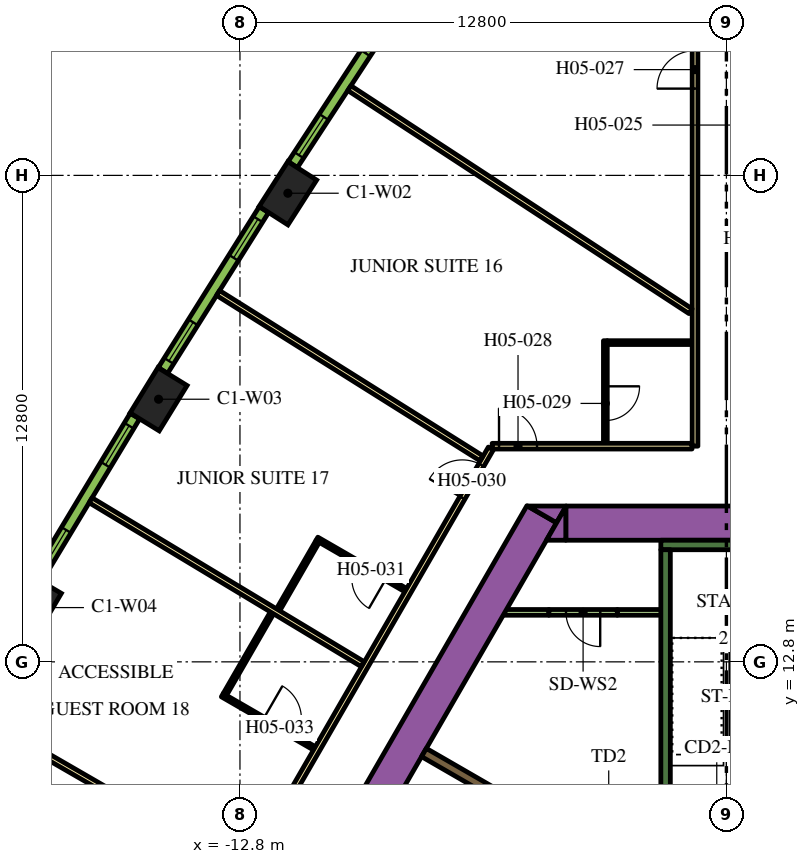
"""IFC4 building model, lengths in metres.
Left out: names, types, materials, properties, quantities, classifications, styles, units other than length and angle.
Written with IfcOpenShell. Run it as: python <this file> out.ifc"""

import sys

from ifc_helpers import new_model, si_unit, direction, frame, frame_2d, origin, origin_2d, place, context, subcontext, project, spatial, polyline, rectangle, outline, extrude, element, fill, save


model = new_model("IFC4")
c1 = context("Model", 3, precision=1e-05, world=origin(), true_north=direction((0.0, 1.0)))
c2 = subcontext(c1, "Body", "Model", "MODEL_VIEW")
j1 = project(units=[si_unit("LENGTHUNIT", "METRE"), si_unit("PLANEANGLEUNIT", "RADIAN")], contexts=[c1])
p1 = place(None, origin())
s1 = spatial("IfcSite", under=j1, at=p1, CompositionType="ELEMENT")
p2 = place(p1, origin())
s2 = spatial("IfcBuilding", under=s1, at=p2, CompositionType="ELEMENT")
p3 = place(p2, frame((0.0, 0.0, 74.4)))
s3 = spatial("IfcBuildingStorey", under=s2, at=p3, CompositionType="ELEMENT", Elevation=74.4)
for number, where, z_axis, x_axis in (
    (1, (-11.539, 25.131, 0.0), (0.0, 0.0, 1.0), (-0.539, -0.842, 0.0)),
    (2, (-14.942, 19.71, 0.0), (0.0, 0.0, 1.0), (-0.524, -0.852, 0.0)),
    (3, (-18.243, 14.228, 0.0), (0.0, 0.0, 1.0), (-0.508, -0.861, 0.0)),
):
    element("IfcColumn", number, at=place(p3, frame(where, z_axis=z_axis, x_axis=x_axis)), inside=s3, PredefinedType="COLUMN", context=c2, shape_type="SweptSolid", body=[
        extrude(rectangle(XDim=1.4, YDim=0.9, at=origin_2d()), origin(), (0.0, 0.0, 1.0), 3.9),
    ])
p4 = place(p3, frame((-15.36, -1.503, 0.0), z_axis=(0.0, 0.0, 1.0), x_axis=(0.50000389221, 0.866023156604, 0.0)))
e4 = element("IfcWall", 4, at=p4, inside=s3, PredefinedType="SOLIDWALL", context=c2, shape_type="SweptSolid", body=[
    extrude(rectangle(XDim=21.0, YDim=0.9, at=frame_2d((10.5, 0.0))), origin(), (0.0, 0.0, 1.0), 3.9),
])
p5 = place(p3, origin())
e5 = element("IfcWall", 5, at=p5, inside=s3, PredefinedType="SOLIDWALL", context=c2, shape_type="SweptSolid", body=[
    extrude(outline(polyline([(-4.215, 16.9), (-4.469, 16.46), (-5.231, 16.9), (-4.215, 16.9)])), origin(), (0.0, 0.0, 1.0), 3.9),
])
p6 = place(p3, frame((-4.224, 16.45, 0.0), z_axis=(0.0, 0.0, 1.0), x_axis=(1.0, 0.0, 0.0)))
e6 = element("IfcWall", 6, at=p6, inside=s3, PredefinedType="SOLIDWALL", context=c2, shape_type="SweptSolid", body=[
    extrude(rectangle(XDim=9.488, YDim=0.9, at=frame_2d((4.744, 0.0))), origin(), (0.0, 0.0, 1.0), 3.9),
])
e7 = element("IfcWall", 7, at=p5, inside=s3, PredefinedType="SOLIDWALL", context=c2, shape_type="SweptSolid", body=[
    extrude(outline(polyline([(-4.734, 16.0), (-4.226, 16.88), (-4.226, 16.0), (-4.734, 16.0)])), origin(), (0.0, 0.0, 1.0), 3.9),
])
p7 = place(p3, frame((-1.725, 15.875, 0.0), z_axis=(0.0, 0.0, 1.0), x_axis=(1.0, 0.0, 0.0)))
e8 = element("IfcWall", 8, at=p7, inside=s3, PredefinedType="SOLIDWALL", context=c2, shape_type="SweptSolid", body=[
    extrude(rectangle(XDim=3.45, YDim=0.25, at=frame_2d((1.725, 0.0))), origin(), (0.0, 0.0, 1.0), 3.9),
])
p8 = place(p3, frame((-1.6, 8.7, 0.0), z_axis=(0.0, 0.0, 1.0), x_axis=(0.0, 1.0, 0.0)))
e9 = element("IfcWall", 9, at=p8, inside=s3, PredefinedType="SOLIDWALL", context=c2, shape_type="SweptSolid", body=[
    extrude(rectangle(XDim=7.05, YDim=0.25, at=frame_2d((3.525, 0.0))), origin(), (0.0, 0.0, 1.0), 3.9),
])
p9 = place(p3, frame((-7.959, 10.415, 0.0), z_axis=(0.0, 0.0, 1.0), x_axis=(0.866020958405, -0.500007699544, 0.0)))
e10 = element("IfcWall", 10, at=p9, inside=s3, PredefinedType="SOLIDWALL", context=c2, shape_type="SweptSolid", body=[
    extrude(rectangle(XDim=4.1, YDim=0.25, at=frame_2d((2.05, 0.0))), origin(), (0.0, 0.0, 1.0), 3.9),
])
p10 = place(p3, frame((-5.851, 14.102, 0.0), z_axis=(0.0, 0.0, 1.0), x_axis=(1.0, 0.0, 0.0)))
e11 = element("IfcWall", 11, at=p10, inside=s3, PredefinedType="PARTITIONING", context=c2, shape_type="SweptSolid", body=[
    extrude(rectangle(XDim=1.18, YDim=0.15, at=frame_2d((0.59, 0.0))), origin(), (0.0, 0.0, 1.0), 2.7),
])
p11 = place(p3, frame((-2.871, 14.102, 0.0), z_axis=(0.0, 0.0, 1.0), x_axis=(1.0, 0.0, 0.0)))
e12 = element("IfcWall", 12, at=p11, inside=s3, PredefinedType="PARTITIONING", context=c2, shape_type="SweptSolid", body=[
    extrude(rectangle(XDim=1.196, YDim=0.15, at=frame_2d((0.598, 0.0))), origin(), (0.0, 0.0, 1.0), 2.7),
])
p12 = place(p3, frame((-2.871, 14.102, 0.0), z_axis=(0.0, 0.0, 1.0), x_axis=(-1.0, 0.0, 0.0)))
e13 = element("IfcWall", 13, at=p12, inside=s3, PredefinedType="PARTITIONING", context=c2, shape_type="SweptSolid", body=[
    extrude(rectangle(XDim=1.8, YDim=0.15, at=frame_2d((0.9, 0.0))), origin(), (0.0, 0.0, 1.0), 2.7),
])
p13 = place(p12, frame((0.45, 0.0, 0.0)))
e14 = element("IfcOpeningElement", 14, at=p13, cuts=e13, PredefinedType="OPENING", context=c2, shape_type="SweptSolid", body=[
    extrude(rectangle(XDim=0.9, YDim=2.1, at=frame_2d((0.45, 1.05))), frame((0.0, 0.085, 0.0), z_axis=(0.0, -1.0, 0.0), x_axis=(1.0, 0.0, 0.0)), (0.0, 0.0, 1.0), 0.17),
])
p14 = place(p3, frame((-0.825, 18.475, 0.0), z_axis=(0.0, 0.0, 1.0), x_axis=(0.0, 1.0, 0.0)))
e15 = element("IfcWall", 15, at=p14, inside=s3, PredefinedType="PARTITIONING", context=c2, shape_type="SweptSolid", body=[
    extrude(rectangle(XDim=16.224, YDim=0.15, at=frame_2d((8.112, 0.0))), origin(), (0.0, 0.0, 1.0), 2.7),
])
p15 = place(p14, frame((9.408, 0.0, 0.0)))
e16 = element("IfcOpeningElement", 16, at=p15, cuts=e15, PredefinedType="OPENING", context=c2, shape_type="SweptSolid", body=[
    extrude(rectangle(XDim=1.0, YDim=2.1, at=frame_2d((0.5, 1.05))), frame((0.0, 0.085, 0.0), z_axis=(0.0, -1.0, 0.0), x_axis=(1.0, 0.0, 0.0)), (0.0, 0.0, 1.0), 0.17),
])
p16 = place(p3, frame((-6.163, 18.475, 0.0), z_axis=(0.0, 0.0, 1.0), x_axis=(1.0, 0.0, 0.0)))
e17 = element("IfcWall", 17, at=p16, inside=s3, PredefinedType="PARTITIONING", context=c2, shape_type="SweptSolid", body=[
    extrude(rectangle(XDim=5.258, YDim=0.15, at=frame_2d((2.629, 0.0))), origin(), (0.0, 0.0, 1.0), 2.7),
])
p17 = place(p16, frame((0.18, 0.0, 0.0)))
e18 = element("IfcOpeningElement", 18, at=p17, cuts=e17, PredefinedType="OPENING", context=c2, shape_type="SweptSolid", body=[
    extrude(rectangle(XDim=1.0, YDim=2.1, at=frame_2d((0.5, 1.05))), frame((0.0, 0.085, 0.0), z_axis=(0.0, -1.0, 0.0), x_axis=(1.0, 0.0, 0.0)), (0.0, 0.0, 1.0), 0.17),
])
p18 = place(p3, frame((-19.081, -3.9, 0.0), z_axis=(0.0, 0.0, 1.0), x_axis=(0.499998313975, 0.866026377209, 0.0)))
e19 = element("IfcWall", 19, at=p18, inside=s3, PredefinedType="PARTITIONING", context=c2, shape_type="SweptSolid", body=[
    extrude(rectangle(XDim=25.766, YDim=0.15, at=frame_2d((12.883, 0.0))), origin(), (0.0, 0.0, 1.0), 2.7),
])
p19 = place(p18, frame((24.265, 0.0, 0.0)))
e20 = element("IfcOpeningElement", 20, at=p19, cuts=e19, PredefinedType="OPENING", context=c2, shape_type="SweptSolid", body=[
    extrude(rectangle(XDim=1.0, YDim=2.1, at=frame_2d((0.5, 1.05))), frame((0.0, 0.085, 0.0), z_axis=(0.0, -1.0, 0.0), x_axis=(1.0, 0.0, 0.0)), (0.0, 0.0, 1.0), 0.17),
])
p20 = place(p18, frame((13.146, 0.0, 0.0)))
e21 = element("IfcOpeningElement", 21, at=p20, cuts=e19, PredefinedType="OPENING", context=c2, shape_type="SweptSolid", body=[
    extrude(rectangle(XDim=1.1, YDim=2.1, at=frame_2d((0.55, 1.05))), frame((0.0, 0.085, 0.0), z_axis=(0.0, -1.0, 0.0), x_axis=(1.0, 0.0, 0.0)), (0.0, 0.0, 1.0), 0.17),
])
p21 = place(p18, frame((11.693, 0.0, 0.0)))
e22 = element("IfcOpeningElement", 22, at=p21, cuts=e19, PredefinedType="OPENING", context=c2, shape_type="SweptSolid", body=[
    extrude(rectangle(XDim=1.0, YDim=2.1, at=frame_2d((0.5, 1.05))), frame((0.0, 0.085, 0.0), z_axis=(0.0, -1.0, 0.0), x_axis=(1.0, 0.0, 0.0)), (0.0, 0.0, 1.0), 0.17),
])
p22 = place(p18, frame((0.18, 0.0, 0.0)))
e23 = element("IfcOpeningElement", 23, at=p22, cuts=e19, PredefinedType="OPENING", context=c2, shape_type="SweptSolid", body=[
    extrude(rectangle(XDim=1.0, YDim=2.1, at=frame_2d((0.5, 1.05))), frame((0.0, 0.085, 0.0), z_axis=(0.0, -1.0, 0.0), x_axis=(1.0, 0.0, 0.0)), (0.0, 0.0, 1.0), 0.17),
])
p23 = place(p3, frame((-19.982, 11.537, 0.0), z_axis=(0.0, 0.0, 1.0), x_axis=(0.866020994654, -0.500007636761, 0.0)))
e24 = element("IfcWall", 24, at=p23, inside=s3, PredefinedType="PARTITIONING", context=c2, shape_type="SweptSolid", body=[
    extrude(rectangle(XDim=8.423, YDim=0.15, at=frame_2d((4.211, 0.0))), origin(), (0.0, 0.0, 1.0), 2.7),
])
p24 = place(p3, frame((-16.729, 17.052, 0.0), z_axis=(0.0, 0.0, 1.0), x_axis=(0.856630606266, -0.515930232113, 0.0)))
e25 = element("IfcWall", 25, at=p24, inside=s3, PredefinedType="PARTITIONING", context=c2, shape_type="SweptSolid", body=[
    extrude(rectangle(XDim=8.355, YDim=0.15, at=frame_2d((4.178, 0.0))), origin(), (0.0, 0.0, 1.0), 2.7),
])
p25 = place(p3, frame((-13.376, 22.506, 0.0), z_axis=(0.0, 0.0, 1.0), x_axis=(0.846945608893, -0.531679542183, 0.0)))
e26 = element("IfcWall", 26, at=p25, inside=s3, PredefinedType="PARTITIONING", context=c2, shape_type="SweptSolid", body=[
    extrude(rectangle(XDim=8.182, YDim=0.15, at=frame_2d((4.091, 0.0))), origin(), (0.0, 0.0, 1.0), 2.7),
])
p26 = place(p3, frame((-9.922, 27.896, 0.0), z_axis=(0.0, 0.0, 1.0), x_axis=(0.836970816595, -0.547247523675, 0.0)))
e27 = element("IfcWall", 27, at=p26, inside=s3, PredefinedType="PARTITIONING", context=c2, shape_type="SweptSolid", body=[
    extrude(rectangle(XDim=10.729, YDim=0.15, at=frame_2d((5.364, 0.0))), origin(), (0.0, 0.0, 1.0), 2.7),
])
p27 = place(p3, frame((-3.185, 21.25, 0.0), z_axis=(0.0, 0.0, 1.0), x_axis=(0.0, -1.0, 0.0)))
e28 = element("IfcWall", 28, at=p27, inside=s3, PredefinedType="PARTITIONING", context=c2, shape_type="SweptSolid", body=[
    extrude(rectangle(XDim=2.7, YDim=0.1, at=frame_2d((1.35, 0.0))), origin(), (0.0, 0.0, 1.0), 2.7),
])
p28 = place(p27, frame((1.2, 0.0, 0.0)))
e29 = element("IfcOpeningElement", 29, at=p28, cuts=e28, PredefinedType="OPENING", context=c2, shape_type="SweptSolid", body=[
    extrude(rectangle(XDim=0.9, YDim=2.1, at=frame_2d((0.45, 1.05))), frame((0.0, 0.06, 0.0), z_axis=(0.0, -1.0, 0.0), x_axis=(1.0, 0.0, 0.0)), (0.0, 0.0, 1.0), 0.12),
])
p29 = place(p3, frame((-3.135, 21.2, 0.0), z_axis=(0.0, 0.0, 1.0), x_axis=(1.0, 0.0, 0.0)))
e30 = element("IfcWall", 30, at=p29, inside=s3, PredefinedType="PARTITIONING", context=c2, shape_type="SweptSolid", body=[
    extrude(rectangle(XDim=2.23, YDim=0.1, at=frame_2d((1.115, 0.0))), origin(), (0.0, 0.0, 1.0), 2.7),
])
p30 = place(p3, frame((-8.437, 14.687, 0.0), z_axis=(0.0, 0.0, 1.0), x_axis=(-0.866019956843, 0.50000943426, 0.0)))
e31 = element("IfcWall", 31, at=p30, inside=s3, PredefinedType="PARTITIONING", context=c2, shape_type="SweptSolid", body=[
    extrude(rectangle(XDim=2.7, YDim=0.1, at=frame_2d((1.35, 0.0))), origin(), (0.0, 0.0, 1.0), 2.7),
])
p31 = place(p30, frame((0.6, 0.0, 0.0)))
e32 = element("IfcOpeningElement", 32, at=p31, cuts=e31, PredefinedType="OPENING", context=c2, shape_type="SweptSolid", body=[
    extrude(rectangle(XDim=0.9, YDim=2.1, at=frame_2d((0.45, 1.05))), frame((0.0, 0.06, 0.0), z_axis=(0.0, -1.0, 0.0), x_axis=(1.0, 0.0, 0.0)), (0.0, 0.0, 1.0), 0.12),
])
p32 = place(p3, frame((-10.757, 15.969, 0.0), z_axis=(0.0, 0.0, 1.0), x_axis=(-0.499957272447, -0.866050071143, 0.0)))
e33 = element("IfcWall", 33, at=p32, inside=s3, PredefinedType="PARTITIONING", context=c2, shape_type="SweptSolid", body=[
    extrude(rectangle(XDim=2.07, YDim=0.1, at=frame_2d((1.035, 0.0))), origin(), (0.0, 0.0, 1.0), 2.7),
])
p33 = place(p3, frame((-13.265, 11.924, 0.0), z_axis=(0.0, 0.0, 1.0), x_axis=(0.866034573852, -0.49998411664, 0.0)))
e34 = element("IfcWall", 34, at=p33, inside=s3, PredefinedType="PARTITIONING", context=c2, shape_type="SweptSolid", body=[
    extrude(rectangle(XDim=2.8, YDim=0.1, at=frame_2d((1.4, 0.0))), origin(), (0.0, 0.0, 1.0), 2.7),
])
p34 = place(p33, frame((1.25, 0.0, 0.0)))
e35 = element("IfcOpeningElement", 35, at=p34, cuts=e34, PredefinedType="OPENING", context=c2, shape_type="SweptSolid", body=[
    extrude(rectangle(XDim=1.0, YDim=2.1, at=frame_2d((0.5, 1.05))), frame((0.0, 0.06, 0.0), z_axis=(0.0, -1.0, 0.0), x_axis=(1.0, 0.0, 0.0)), (0.0, 0.0, 1.0), 0.12),
])
p35 = place(p3, frame((-13.197, 11.942, 0.0), z_axis=(0.0, 0.0, 1.0), x_axis=(0.499944914708, 0.866057204957, 0.0)))
e36 = element("IfcWall", 36, at=p35, inside=s3, PredefinedType="PARTITIONING", context=c2, shape_type="SweptSolid", body=[
    extrude(rectangle(XDim=2.47, YDim=0.1, at=frame_2d((1.235, 0.0))), origin(), (0.0, 0.0, 1.0), 2.7),
])
p36 = place(p3, frame((-8.676, 30.068, 0.0), z_axis=(0.0, 0.0, 1.0), x_axis=(-0.547204617628, -0.836998868845, 0.0)))
e37 = element("IfcWall", 37, at=p36, inside=s3, PredefinedType="SOLIDWALL", context=c2, shape_type="SweptSolid", body=[
    extrude(rectangle(XDim=4.998, YDim=0.29, at=frame_2d((2.499, 0.0))), origin(), (0.0, 0.0, 1.0), 3.6),
])
p37 = place(p36, frame((0.297, 0.0, 0.9)))
e38 = element("IfcOpeningElement", 38, at=p37, cuts=e37, PredefinedType="OPENING", context=c2, shape_type="SweptSolid", body=[
    extrude(rectangle(XDim=1.2, YDim=2.15, at=frame_2d((0.6, 1.075))), frame((0.0, 0.155, 0.0), z_axis=(0.0, -1.0, 0.0), x_axis=(1.0, 0.0, 0.0)), (0.0, 0.0, 1.0), 0.31),
])
p38 = place(p36, frame((3.501, 0.0, 0.9)))
e39 = element("IfcOpeningElement", 39, at=p38, cuts=e37, PredefinedType="OPENING", context=c2, shape_type="SweptSolid", body=[
    extrude(rectangle(XDim=1.2, YDim=2.15, at=frame_2d((0.6, 1.075))), frame((0.0, 0.155, 0.0), z_axis=(0.0, -1.0, 0.0), x_axis=(1.0, 0.0, 0.0)), (0.0, 0.0, 1.0), 0.31),
])
p39 = place(p3, frame((-12.17, 24.699, 0.0), z_axis=(0.0, 0.0, 1.0), x_axis=(-0.531688286542, -0.846940119462, 0.0)))
e40 = element("IfcWall", 40, at=p39, inside=s3, PredefinedType="SOLIDWALL", context=c2, shape_type="SweptSolid", body=[
    extrude(rectangle(XDim=4.998, YDim=0.29, at=frame_2d((2.499, 0.0))), origin(), (0.0, 0.0, 1.0), 3.6),
])
p40 = place(p39, frame((0.297, 0.0, 0.9)))
e41 = element("IfcOpeningElement", 41, at=p40, cuts=e40, PredefinedType="OPENING", context=c2, shape_type="SweptSolid", body=[
    extrude(rectangle(XDim=1.2, YDim=2.15, at=frame_2d((0.6, 1.075))), frame((0.0, 0.155, 0.0), z_axis=(0.0, -1.0, 0.0), x_axis=(1.0, 0.0, 0.0)), (0.0, 0.0, 1.0), 0.31),
])
p41 = place(p39, frame((3.501, 0.0, 0.9)))
e42 = element("IfcOpeningElement", 42, at=p41, cuts=e40, PredefinedType="OPENING", context=c2, shape_type="SweptSolid", body=[
    extrude(rectangle(XDim=1.2, YDim=2.15, at=frame_2d((0.6, 1.075))), frame((0.0, 0.155, 0.0), z_axis=(0.0, -1.0, 0.0), x_axis=(1.0, 0.0, 0.0)), (0.0, 0.0, 1.0), 0.31),
])
p42 = place(p3, frame((-15.564, 19.267, 0.0), z_axis=(0.0, 0.0, 1.0), x_axis=(-0.515938796285, -0.856625448191, 0.0)))
e43 = element("IfcWall", 43, at=p42, inside=s3, PredefinedType="SOLIDWALL", context=c2, shape_type="SweptSolid", body=[
    extrude(rectangle(XDim=4.998, YDim=0.29, at=frame_2d((2.499, 0.0))), origin(), (0.0, 0.0, 1.0), 3.6),
])
p43 = place(p42, frame((0.297, 0.0, 0.9)))
e44 = element("IfcOpeningElement", 44, at=p43, cuts=e43, PredefinedType="OPENING", context=c2, shape_type="SweptSolid", body=[
    extrude(rectangle(XDim=1.2, YDim=2.15, at=frame_2d((0.6, 1.075))), frame((0.0, 0.155, 0.0), z_axis=(0.0, -1.0, 0.0), x_axis=(1.0, 0.0, 0.0)), (0.0, 0.0, 1.0), 0.31),
])
p44 = place(p42, frame((3.501, 0.0, 0.9)))
e45 = element("IfcOpeningElement", 45, at=p44, cuts=e43, PredefinedType="OPENING", context=c2, shape_type="SweptSolid", body=[
    extrude(rectangle(XDim=1.2, YDim=2.15, at=frame_2d((0.6, 1.075))), frame((0.0, 0.155, 0.0), z_axis=(0.0, -1.0, 0.0), x_axis=(1.0, 0.0, 0.0)), (0.0, 0.0, 1.0), 0.31),
])
p45 = place(p13, origin())
e46 = element("IfcDoor", 46, at=p45, inside=s3, OperationType="SINGLE_SWING_LEFT", PredefinedType="DOOR", context=c2, shape_type="SweptSolid", body=[
    extrude(rectangle(XDim=0.9, YDim=2.1, at=frame_2d((0.45, 1.05))), frame((0.0, 0.025, 0.0), z_axis=(0.0, -1.0, 0.0), x_axis=(1.0, 0.0, 0.0)), (0.0, 0.0, 1.0), 0.05),
])
fill(e14, e46)
p46 = place(p15, origin())
e47 = element("IfcDoor", 47, at=p46, inside=s3, OperationType="SINGLE_SWING_LEFT", PredefinedType="DOOR", context=c2, shape_type="SweptSolid", body=[
    extrude(rectangle(XDim=1.0, YDim=2.1, at=frame_2d((0.5, 1.05))), frame((0.0, 0.025, 0.0), z_axis=(0.0, -1.0, 0.0), x_axis=(1.0, 0.0, 0.0)), (0.0, 0.0, 1.0), 0.05),
])
fill(e16, e47)
p47 = place(p17, origin())
e48 = element("IfcDoor", 48, at=p47, inside=s3, OperationType="SINGLE_SWING_LEFT", PredefinedType="DOOR", context=c2, shape_type="SweptSolid", body=[
    extrude(rectangle(XDim=1.0, YDim=2.1, at=frame_2d((0.5, 1.05))), frame((0.0, 0.025, 0.0), z_axis=(0.0, -1.0, 0.0), x_axis=(1.0, 0.0, 0.0)), (0.0, 0.0, 1.0), 0.05),
])
fill(e18, e48)
p48 = place(p28, origin())
e49 = element("IfcDoor", 49, at=p48, inside=s3, OperationType="SINGLE_SWING_LEFT", PredefinedType="DOOR", context=c2, shape_type="SweptSolid", body=[
    extrude(rectangle(XDim=0.9, YDim=2.1, at=frame_2d((0.45, 1.05))), frame((0.0, 0.025, 0.0), z_axis=(0.0, -1.0, 0.0), x_axis=(1.0, 0.0, 0.0)), (0.0, 0.0, 1.0), 0.05),
])
fill(e29, e49)
p49 = place(p19, origin())
e50 = element("IfcDoor", 50, at=p49, inside=s3, OperationType="SINGLE_SWING_RIGHT", PredefinedType="DOOR", context=c2, shape_type="SweptSolid", body=[
    extrude(rectangle(XDim=1.0, YDim=2.1, at=frame_2d((0.5, 1.05))), frame((0.0, 0.025, 0.0), z_axis=(0.0, -1.0, 0.0), x_axis=(1.0, 0.0, 0.0)), (0.0, 0.0, 1.0), 0.05),
])
fill(e20, e50)
p50 = place(p31, origin())
e51 = element("IfcDoor", 51, at=p50, inside=s3, OperationType="SINGLE_SWING_LEFT", PredefinedType="DOOR", context=c2, shape_type="SweptSolid", body=[
    extrude(rectangle(XDim=0.9, YDim=2.1, at=frame_2d((0.45, 1.05))), frame((0.0, 0.025, 0.0), z_axis=(0.0, -1.0, 0.0), x_axis=(1.0, 0.0, 0.0)), (0.0, 0.0, 1.0), 0.05),
])
fill(e32, e51)
p51 = place(p34, origin())
e52 = element("IfcDoor", 52, at=p51, inside=s3, OperationType="SINGLE_SWING_RIGHT", PredefinedType="DOOR", context=c2, shape_type="SweptSolid", body=[
    extrude(rectangle(XDim=1.0, YDim=2.1, at=frame_2d((0.5, 1.05))), frame((0.0, 0.025, 0.0), z_axis=(0.0, -1.0, 0.0), x_axis=(1.0, 0.0, 0.0)), (0.0, 0.0, 1.0), 0.05),
])
fill(e35, e52)
p52 = place(p37, origin())
e53 = element("IfcWindow", 53, at=p52, inside=s3, PartitioningType="DOUBLE_PANEL_VERTICAL", PredefinedType="WINDOW", context=c2, shape_type="SweptSolid", body=[
    extrude(rectangle(XDim=1.2, YDim=2.15, at=frame_2d((0.6, 1.075))), frame((0.0, 0.015, 0.0), z_axis=(0.0, -1.0, 0.0), x_axis=(1.0, 0.0, 0.0)), (0.0, 0.0, 1.0), 0.06),
])
fill(e38, e53)
p53 = place(p38, origin())
e54 = element("IfcWindow", 54, at=p53, inside=s3, PartitioningType="DOUBLE_PANEL_VERTICAL", PredefinedType="WINDOW", context=c2, shape_type="SweptSolid", body=[
    extrude(rectangle(XDim=1.2, YDim=2.15, at=frame_2d((0.6, 1.075))), frame((0.0, 0.015, 0.0), z_axis=(0.0, -1.0, 0.0), x_axis=(1.0, 0.0, 0.0)), (0.0, 0.0, 1.0), 0.06),
])
fill(e39, e54)
p54 = place(p40, origin())
e55 = element("IfcWindow", 55, at=p54, inside=s3, PartitioningType="DOUBLE_PANEL_VERTICAL", PredefinedType="WINDOW", context=c2, shape_type="SweptSolid", body=[
    extrude(rectangle(XDim=1.2, YDim=2.15, at=frame_2d((0.6, 1.075))), frame((0.0, 0.015, 0.0), z_axis=(0.0, -1.0, 0.0), x_axis=(1.0, 0.0, 0.0)), (0.0, 0.0, 1.0), 0.06),
])
fill(e41, e55)
p55 = place(p41, origin())
e56 = element("IfcWindow", 56, at=p55, inside=s3, PartitioningType="DOUBLE_PANEL_VERTICAL", PredefinedType="WINDOW", context=c2, shape_type="SweptSolid", body=[
    extrude(rectangle(XDim=1.2, YDim=2.15, at=frame_2d((0.6, 1.075))), frame((0.0, 0.015, 0.0), z_axis=(0.0, -1.0, 0.0), x_axis=(1.0, 0.0, 0.0)), (0.0, 0.0, 1.0), 0.06),
])
fill(e42, e56)
p56 = place(p43, origin())
e57 = element("IfcWindow", 57, at=p56, inside=s3, PartitioningType="DOUBLE_PANEL_VERTICAL", PredefinedType="WINDOW", context=c2, shape_type="SweptSolid", body=[
    extrude(rectangle(XDim=1.2, YDim=2.15, at=frame_2d((0.6, 1.075))), frame((0.0, 0.015, 0.0), z_axis=(0.0, -1.0, 0.0), x_axis=(1.0, 0.0, 0.0)), (0.0, 0.0, 1.0), 0.06),
])
fill(e44, e57)
p57 = place(p44, origin())
e58 = element("IfcWindow", 58, at=p57, inside=s3, PartitioningType="DOUBLE_PANEL_VERTICAL", PredefinedType="WINDOW", context=c2, shape_type="SweptSolid", body=[
    extrude(rectangle(XDim=1.2, YDim=2.15, at=frame_2d((0.6, 1.075))), frame((0.0, 0.015, 0.0), z_axis=(0.0, -1.0, 0.0), x_axis=(1.0, 0.0, 0.0)), (0.0, 0.0, 1.0), 0.06),
])
fill(e45, e58)
save(model, sys.argv[1])
